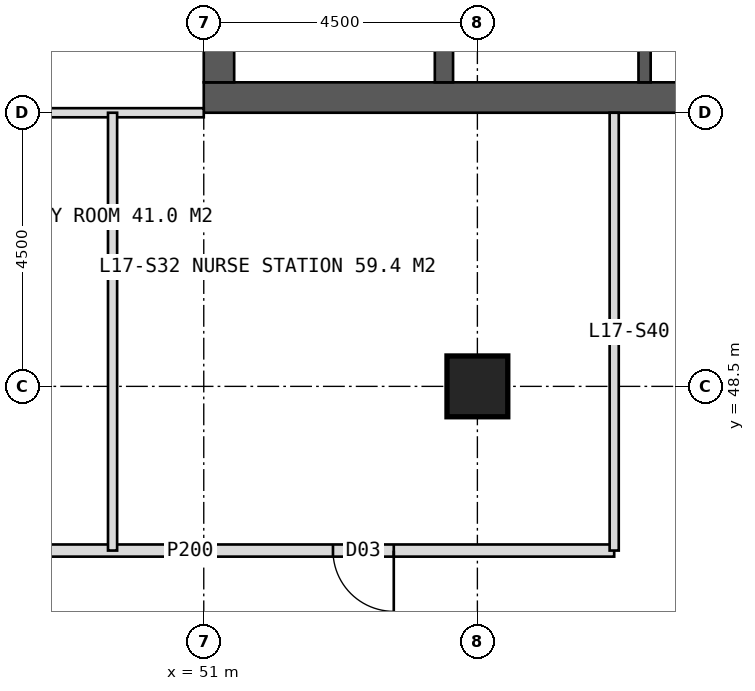
"""IFC4 building model, lengths in metres.
Left out: names, types, materials, properties, quantities, classifications, styles, units other than length and angle.
Written with IfcOpenShell. Run it as: python <this file> out.ifc"""

import sys

from ifc_helpers import new_model, si_unit, direction, frame, frame_2d, origin, origin_2d, place, context, subcontext, project, spatial, rectangle, hollow_rectangle, extrude, element, fill, save


model = new_model("IFC4")
c1 = context("Model", 3, precision=1e-05, world=origin(), true_north=direction((0.0, 1.0)))
c2 = subcontext(c1, "Body", "Model", "MODEL_VIEW")
j1 = project(units=[si_unit("LENGTHUNIT", "METRE"), si_unit("PLANEANGLEUNIT", "RADIAN")], contexts=[c1])
p1 = place(None, origin())
s1 = spatial("IfcSite", under=j1, at=p1, CompositionType="ELEMENT")
p2 = place(p1, origin())
s2 = spatial("IfcBuilding", under=s1, at=p2, CompositionType="ELEMENT")
p3 = place(p2, frame((0.0, 0.0, 75.0)))
s3 = spatial("IfcBuildingStorey", under=s2, at=p3, CompositionType="ELEMENT", Elevation=75.0)
p4 = place(p3, frame((51.0, 53.25, 0.0), z_axis=(0.0, 0.0, 1.0), x_axis=(1.0, 0.0, 0.0)))
e1 = element("IfcWall", 1, at=p4, inside=s3, PredefinedType="SHEAR", context=c2, shape_type="SweptSolid", body=[
    extrude(rectangle(XDim=18.0, YDim=0.5, at=frame_2d((9.0, 0.0))), origin(), (0.0, 0.0, 1.0), 4.0),
])
p5 = place(p4, frame((8.1, 0.0, 0.0)))
e2 = element("IfcOpeningElement", 2, at=p5, cuts=e1, PredefinedType="OPENING", context=c2, shape_type="SweptSolid", body=[
    extrude(rectangle(XDim=1.8, YDim=2.2, at=frame_2d((0.9, 1.1))), frame((0.0, 0.26, 0.0), z_axis=(0.0, -1.0, 0.0), x_axis=(1.0, 0.0, 0.0)), (0.0, 0.0, 1.0), 0.52),
])
p6 = place(p3, frame((51.25, 53.5, 0.0), z_axis=(0.0, 0.0, 1.0), x_axis=(0.0, 1.0, 0.0)))
e3 = element("IfcWall", 3, at=p6, inside=s3, PredefinedType="SHEAR", context=c2, shape_type="SweptSolid", body=[
    extrude(rectangle(XDim=17.0, YDim=0.5, at=frame_2d((8.5, 0.0))), origin(), (0.0, 0.0, 1.0), 4.0),
])
p7 = place(p6, frame((6.0, 0.0, 0.0)))
e4 = element("IfcOpeningElement", 4, at=p7, cuts=e3, PredefinedType="OPENING", context=c2, shape_type="SweptSolid", body=[
    extrude(rectangle(XDim=1.5, YDim=2.2, at=frame_2d((0.75, 1.1))), frame((0.0, 0.26, 0.0), z_axis=(0.0, -1.0, 0.0), x_axis=(1.0, 0.0, 0.0)), (0.0, 0.0, 1.0), 0.52),
])
p8 = place(p3, frame((54.95, 53.5, 0.0), z_axis=(0.0, 0.0, 1.0), x_axis=(0.0, 1.0, 0.0)))
e5 = element("IfcWall", 5, at=p8, inside=s3, PredefinedType="SHEAR", context=c2, shape_type="SweptSolid", body=[
    extrude(rectangle(XDim=17.0, YDim=0.3, at=frame_2d((8.5, 0.0))), origin(), (0.0, 0.0, 1.0), 4.0),
])
p9 = place(p3, frame((58.25, 53.5, 0.0), z_axis=(0.0, 0.0, 1.0), x_axis=(0.0, 1.0, 0.0)))
e6 = element("IfcWall", 6, at=p9, inside=s3, PredefinedType="SHEAR", context=c2, shape_type="SweptSolid", body=[
    extrude(rectangle(XDim=17.0, YDim=0.2, at=frame_2d((8.5, 0.0))), origin(), (0.0, 0.0, 1.0), 4.0),
])
p10 = place(p9, frame((1.375, 0.0, 0.0)))
e7 = element("IfcOpeningElement", 7, at=p10, cuts=e6, PredefinedType="OPENING", context=c2, shape_type="SweptSolid", body=[
    extrude(rectangle(XDim=1.4, YDim=2.2, at=frame_2d((0.7, 1.1))), frame((0.0, 0.11, 0.0), z_axis=(0.0, -1.0, 0.0), x_axis=(1.0, 0.0, 0.0)), (0.0, 0.0, 1.0), 0.22),
])
p11 = place(p9, frame((5.675, 0.0, 0.0)))
e8 = element("IfcOpeningElement", 8, at=p11, cuts=e6, PredefinedType="OPENING", context=c2, shape_type="SweptSolid", body=[
    extrude(rectangle(XDim=1.4, YDim=2.2, at=frame_2d((0.7, 1.1))), frame((0.0, 0.11, 0.0), z_axis=(0.0, -1.0, 0.0), x_axis=(1.0, 0.0, 0.0)), (0.0, 0.0, 1.0), 0.22),
])
p12 = place(p3, frame((55.5, 48.5, 0.0), z_axis=(0.0, 0.0, 1.0), x_axis=(1.0, 0.0, 0.0)))
e9 = element("IfcColumn", 9, at=p12, inside=s3, PredefinedType="COLUMN", context=c2, shape_type="SweptSolid", body=[
    extrude(hollow_rectangle(XDim=1.0, YDim=1.0, WallThickness=0.1, at=origin_2d()), origin(), (0.0, 0.0, 1.0), 4.0),
])
p13 = place(p3, frame((51.0, 53.0, 0.0), z_axis=(0.0, 0.0, 1.0), x_axis=(-1.0, 0.0, 0.0)))
e10 = element("IfcWall", 10, at=p13, inside=s3, PredefinedType="PARTITIONING", context=c2, shape_type="SweptSolid", body=[
    extrude(rectangle(XDim=7.2, YDim=0.15, at=frame_2d((3.6, 0.0))), origin(), (0.0, 0.0, 1.0), 3.75),
])
p14 = place(p3, frame((57.75, 45.8, 0.0), z_axis=(0.0, 0.0, 1.0), x_axis=(-1.0, 0.0, 0.0)))
e11 = element("IfcWall", 11, at=p14, inside=s3, PredefinedType="PARTITIONING", context=c2, shape_type="SweptSolid", body=[
    extrude(rectangle(XDim=13.95, YDim=0.2, at=frame_2d((6.975, 0.0))), origin(), (0.0, 0.0, 1.0), 3.75),
])
p15 = place(p14, frame((3.625, 0.0, 0.0)))
e12 = element("IfcOpeningElement", 12, at=p15, cuts=e11, PredefinedType="OPENING", context=c2, shape_type="SweptSolid", body=[
    extrude(rectangle(XDim=1.0, YDim=2.1, at=frame_2d((0.5, 1.05))), frame((0.0, 0.11, 0.0), z_axis=(0.0, -1.0, 0.0), x_axis=(1.0, 0.0, 0.0)), (0.0, 0.0, 1.0), 0.22),
])
p16 = place(p14, frame((10.6, 0.0, 0.0)))
e13 = element("IfcOpeningElement", 13, at=p16, cuts=e11, PredefinedType="OPENING", context=c2, shape_type="SweptSolid", body=[
    extrude(rectangle(XDim=1.0, YDim=2.1, at=frame_2d((0.5, 1.05))), frame((0.0, 0.11, 0.0), z_axis=(0.0, -1.0, 0.0), x_axis=(1.0, 0.0, 0.0)), (0.0, 0.0, 1.0), 0.22),
])
for number, where, z_axis, x_axis in (
    (14, (57.75, 53.0, 0.0), (0.0, 0.0, 1.0), (0.0, -1.0, 0.0)),
    (15, (49.5, 53.0, 0.0), (0.0, 0.0, 1.0), (0.0, -1.0, 0.0)),
):
    element("IfcWall", number, at=place(p3, frame(where, z_axis=z_axis, x_axis=x_axis)), inside=s3, PredefinedType="PARTITIONING", context=c2, shape_type="SweptSolid", body=[
        extrude(rectangle(XDim=7.2, YDim=0.15, at=frame_2d((3.6, 0.0))), origin(), (0.0, 0.0, 1.0), 3.75),
    ])
p17 = place(p15, origin())
e16 = element("IfcDoor", 16, at=p17, inside=s3, OperationType="SINGLE_SWING_LEFT", PredefinedType="DOOR", context=c2, shape_type="SweptSolid", body=[
    extrude(rectangle(XDim=1.0, YDim=2.1, at=frame_2d((0.5, 1.05))), frame((0.0, 0.025, 0.0), z_axis=(0.0, -1.0, 0.0), x_axis=(1.0, 0.0, 0.0)), (0.0, 0.0, 1.0), 0.05),
])
fill(e12, e16)
save(model, sys.argv[1])
